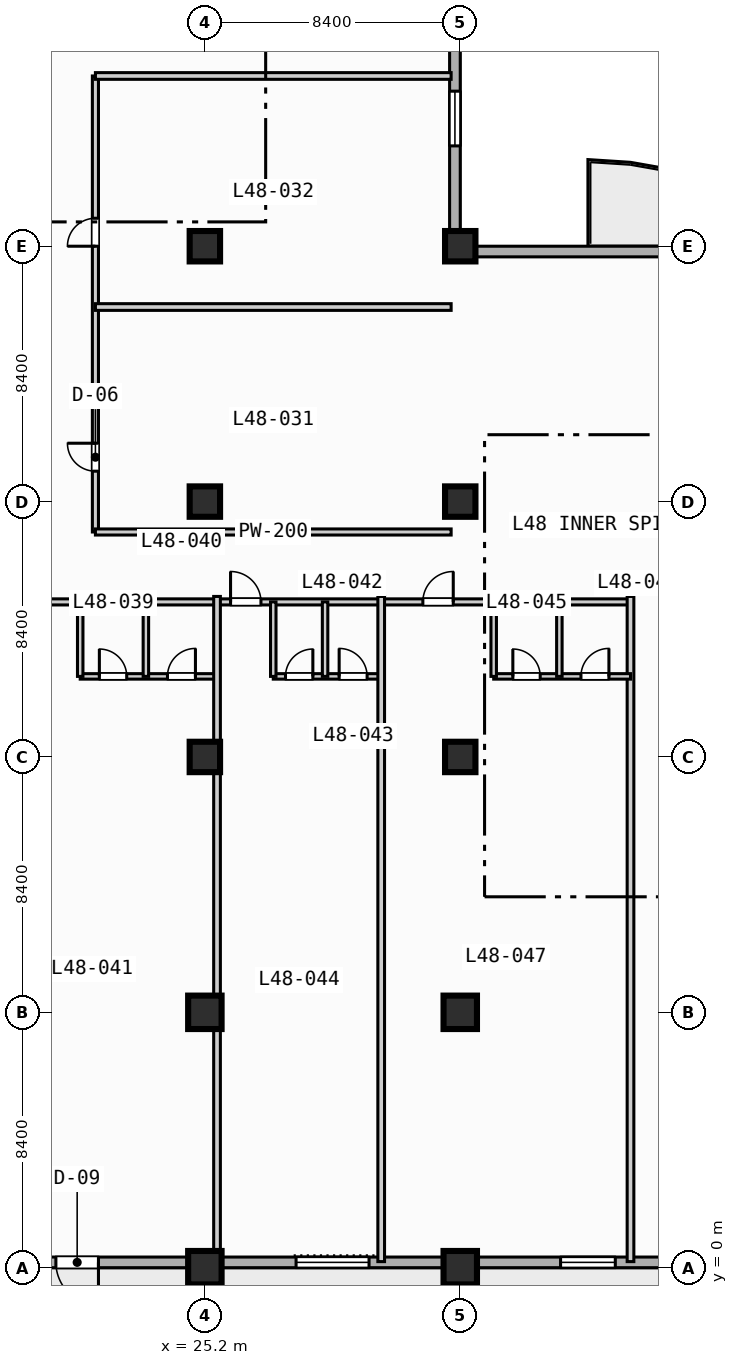
"""IFC4 building model, lengths in metres.
Left out: names, types, materials, properties, quantities, classifications, styles, units other than length and angle.
Written with IfcOpenShell. Run it as: python <this file> out.ifc"""

import sys

from ifc_helpers import new_model, si_unit, direction, frame, frame_2d, origin, origin_2d, place, context, subcontext, project, spatial, rectangle, extrude, element, fill, save


model = new_model("IFC4")
c1 = context("Model", 3, precision=1e-05, world=origin(), true_north=direction((0.0, 1.0)))
c2 = subcontext(c1, "Body", "Model", "MODEL_VIEW")
j1 = project(units=[si_unit("LENGTHUNIT", "METRE"), si_unit("PLANEANGLEUNIT", "RADIAN")], contexts=[c1])
p1 = place(None, origin())
s1 = spatial("IfcSite", under=j1, at=p1, CompositionType="ELEMENT")
p2 = place(p1, origin())
s2 = spatial("IfcBuilding", under=s1, at=p2, CompositionType="ELEMENT")
p3 = place(p2, frame((0.0, 0.0, 197.6)))
s3 = spatial("IfcBuildingStorey", under=s2, at=p3, CompositionType="ELEMENT", Elevation=197.6)
for number, where, z_axis, x_axis in (
    (1, (25.2, 0.0, 0.0), (0.0, 0.0, 1.0), (1.0, 0.0, 0.0)),
    (2, (25.2, 8.4, 0.0), (0.0, 0.0, 1.0), (1.0, 0.0, 0.0)),
):
    element("IfcColumn", number, at=place(p3, frame(where, z_axis=z_axis, x_axis=x_axis)), inside=s3, PredefinedType="COLUMN", context=c2, shape_type="SweptSolid", body=[
        extrude(rectangle(XDim=1.1, YDim=1.1, at=origin_2d()), origin(), (0.0, 0.0, 1.0), 3.7),
    ])
for number, where, z_axis, x_axis in (
    (3, (25.2, 16.8, 0.0), (0.0, 0.0, 1.0), (1.0, 0.0, 0.0)),
    (4, (25.2, 25.2, 0.0), (0.0, 0.0, 1.0), (1.0, 0.0, 0.0)),
    (5, (25.2, 33.6, 0.0), (0.0, 0.0, 1.0), (1.0, 0.0, 0.0)),
):
    element("IfcColumn", number, at=place(p3, frame(where, z_axis=z_axis, x_axis=x_axis)), inside=s3, PredefinedType="COLUMN", context=c2, shape_type="SweptSolid", body=[
        extrude(rectangle(XDim=1.0, YDim=1.0, at=origin_2d()), origin(), (0.0, 0.0, 1.0), 3.7),
    ])
for number, where, z_axis, x_axis in (
    (6, (33.6, 0.0, 0.0), (0.0, 0.0, 1.0), (1.0, 0.0, 0.0)),
    (7, (33.6, 8.4, 0.0), (0.0, 0.0, 1.0), (1.0, 0.0, 0.0)),
):
    element("IfcColumn", number, at=place(p3, frame(where, z_axis=z_axis, x_axis=x_axis)), inside=s3, PredefinedType="COLUMN", context=c2, shape_type="SweptSolid", body=[
        extrude(rectangle(XDim=1.1, YDim=1.1, at=origin_2d()), origin(), (0.0, 0.0, 1.0), 3.7),
    ])
for number, where, z_axis, x_axis in (
    (8, (33.6, 16.8, 0.0), (0.0, 0.0, 1.0), (1.0, 0.0, 0.0)),
    (9, (33.6, 25.2, 0.0), (0.0, 0.0, 1.0), (1.0, 0.0, 0.0)),
    (10, (33.6, 33.6, 0.0), (0.0, 0.0, 1.0), (1.0, 0.0, 0.0)),
):
    element("IfcColumn", number, at=place(p3, frame(where, z_axis=z_axis, x_axis=x_axis)), inside=s3, PredefinedType="COLUMN", context=c2, shape_type="SweptSolid", body=[
        extrude(rectangle(XDim=1.0, YDim=1.0, at=origin_2d()), origin(), (0.0, 0.0, 1.0), 3.7),
    ])
p4 = place(p3, frame((33.425, 72.425, 0.0), z_axis=(0.0, 0.0, 1.0), x_axis=(0.0, -1.0, 0.0)))
e11 = element("IfcWall", 11, at=p4, inside=s3, PredefinedType="STANDARD", context=c2, shape_type="SweptSolid", body=[
    extrude(rectangle(XDim=39.0, YDim=0.35, at=frame_2d((19.5, 0.0))), origin(), (0.0, 0.0, 1.0), 3.47),
])
p5 = place(p4, frame((33.725, 0.0, 0.85)))
e12 = element("IfcOpeningElement", 12, at=p5, cuts=e11, PredefinedType="OPENING", context=c2, shape_type="SweptSolid", body=[
    extrude(rectangle(XDim=1.8, YDim=1.8, at=frame_2d((0.9, 0.9))), frame((0.0, 0.185, 0.0), z_axis=(0.0, -1.0, 0.0), x_axis=(1.0, 0.0, 0.0)), (0.0, 0.0, 1.0), 0.37),
])
p6 = place(p4, frame((16.925, 0.0, 0.85)))
e13 = element("IfcOpeningElement", 13, at=p6, cuts=e11, PredefinedType="OPENING", context=c2, shape_type="SweptSolid", body=[
    extrude(rectangle(XDim=1.8, YDim=1.8, at=frame_2d((0.9, 0.9))), frame((0.0, 0.185, 0.0), z_axis=(0.0, -1.0, 0.0), x_axis=(1.0, 0.0, 0.0)), (0.0, 0.0, 1.0), 0.37),
])
p7 = place(p4, frame((8.225, 0.0, 0.85)))
e14 = element("IfcOpeningElement", 14, at=p7, cuts=e11, PredefinedType="OPENING", context=c2, shape_type="SweptSolid", body=[
    extrude(rectangle(XDim=2.4, YDim=1.95, at=frame_2d((1.2, 0.975))), frame((0.0, 0.185, 0.0), z_axis=(0.0, -1.0, 0.0), x_axis=(1.0, 0.0, 0.0)), (0.0, 0.0, 1.0), 0.37),
])
p8 = place(p3, frame((33.425, 33.425, 0.0), z_axis=(0.0, 0.0, 1.0), x_axis=(1.0, 0.0, 0.0)))
e15 = element("IfcWall", 15, at=p8, inside=s3, PredefinedType="STANDARD", context=c2, shape_type="SweptSolid", body=[
    extrude(rectangle(XDim=39.0, YDim=0.35, at=frame_2d((19.5, 0.0))), origin(), (0.0, 0.0, 1.0), 3.47),
])
p9 = place(p8, frame((12.075, 0.0, 0.0)))
e16 = element("IfcOpeningElement", 16, at=p9, cuts=e15, PredefinedType="OPENING", context=c2, shape_type="SweptSolid", body=[
    extrude(rectangle(XDim=1.4, YDim=2.2, at=frame_2d((0.7, 1.1))), frame((0.0, 0.185, 0.0), z_axis=(0.0, -1.0, 0.0), x_axis=(1.0, 0.0, 0.0)), (0.0, 0.0, 1.0), 0.37),
])
p10 = place(p3, frame((72.425, 0.175, 0.0), z_axis=(0.0, 0.0, 1.0), x_axis=(-1.0, 0.0, 0.0)))
e17 = element("IfcWall", 17, at=p10, inside=s3, PredefinedType="STANDARD", context=c2, shape_type="SweptSolid", body=[
    extrude(rectangle(XDim=69.25, YDim=0.35, at=frame_2d((34.625, 0.0))), origin(), (0.0, 0.0, 1.0), 3.47),
])
p11 = place(p10, frame((50.725, 0.0, 0.0)))
e18 = element("IfcOpeningElement", 18, at=p11, cuts=e17, PredefinedType="OPENING", context=c2, shape_type="SweptSolid", body=[
    extrude(rectangle(XDim=1.4, YDim=2.2, at=frame_2d((0.7, 1.1))), frame((0.0, 0.185, 0.0), z_axis=(0.0, -1.0, 0.0), x_axis=(1.0, 0.0, 0.0)), (0.0, 0.0, 1.0), 0.37),
])
p12 = place(p10, frame((58.625, 0.0, 0.85)))
e19 = element("IfcOpeningElement", 19, at=p12, cuts=e17, PredefinedType="OPENING", context=c2, shape_type="SweptSolid", body=[
    extrude(rectangle(XDim=2.4, YDim=1.95, at=frame_2d((1.2, 0.975))), frame((0.0, 0.185, 0.0), z_axis=(0.0, -1.0, 0.0), x_axis=(1.0, 0.0, 0.0)), (0.0, 0.0, 1.0), 0.37),
])
p13 = place(p10, frame((41.825, 0.0, 0.85)))
e20 = element("IfcOpeningElement", 20, at=p13, cuts=e17, PredefinedType="OPENING", context=c2, shape_type="SweptSolid", body=[
    extrude(rectangle(XDim=2.4, YDim=1.95, at=frame_2d((1.2, 0.975))), frame((0.0, 0.185, 0.0), z_axis=(0.0, -1.0, 0.0), x_axis=(1.0, 0.0, 0.0)), (0.0, 0.0, 1.0), 0.37),
])
p14 = place(p10, frame((33.725, 0.0, 0.85)))
e21 = element("IfcOpeningElement", 21, at=p14, cuts=e17, PredefinedType="OPENING", context=c2, shape_type="SweptSolid", body=[
    extrude(rectangle(XDim=1.8, YDim=1.8, at=frame_2d((0.9, 0.9))), frame((0.0, 0.185, 0.0), z_axis=(0.0, -1.0, 0.0), x_axis=(1.0, 0.0, 0.0)), (0.0, 0.0, 1.0), 0.37),
])
p15 = place(p10, frame((25.025, 0.0, 0.85)))
e22 = element("IfcOpeningElement", 22, at=p15, cuts=e17, PredefinedType="OPENING", context=c2, shape_type="SweptSolid", body=[
    extrude(rectangle(XDim=2.4, YDim=1.95, at=frame_2d((1.2, 0.975))), frame((0.0, 0.185, 0.0), z_axis=(0.0, -1.0, 0.0), x_axis=(1.0, 0.0, 0.0)), (0.0, 0.0, 1.0), 0.37),
])
p16 = place(p10, frame((64.875, 0.0, 0.85)))
e23 = element("IfcOpeningElement", 23, at=p16, cuts=e17, PredefinedType="OPENING", context=c2, shape_type="SweptSolid", body=[
    extrude(rectangle(XDim=1.8, YDim=1.8, at=frame_2d((0.9, 0.9))), frame((0.0, 0.185, 0.0), z_axis=(0.0, -1.0, 0.0), x_axis=(1.0, 0.0, 0.0)), (0.0, 0.0, 1.0), 0.37),
])
p17 = place(p3, frame((21.6, 24.2, 0.0), z_axis=(0.0, 0.0, 1.0), x_axis=(0.0, 1.0, 0.0)))
e24 = element("IfcWall", 24, at=p17, inside=s3, PredefinedType="PARTITIONING", context=c2, shape_type="SweptSolid", body=[
    extrude(rectangle(XDim=15.0, YDim=0.2, at=frame_2d((7.5, 0.0))), origin(), (0.0, 0.0, 1.0), 3.47),
])
p18 = place(p17, frame((2.0, 0.0, 0.0)))
e25 = element("IfcOpeningElement", 25, at=p18, cuts=e24, PredefinedType="OPENING", context=c2, shape_type="SweptSolid", body=[
    extrude(rectangle(XDim=0.92, YDim=2.1, at=frame_2d((0.46, 1.05))), frame((0.0, 0.11, 0.0), z_axis=(0.0, -1.0, 0.0), x_axis=(1.0, 0.0, 0.0)), (0.0, 0.0, 1.0), 0.22),
])
p19 = place(p17, frame((9.4, 0.0, 0.0)))
e26 = element("IfcOpeningElement", 26, at=p19, cuts=e24, PredefinedType="OPENING", context=c2, shape_type="SweptSolid", body=[
    extrude(rectangle(XDim=0.92, YDim=2.1, at=frame_2d((0.46, 1.05))), frame((0.0, 0.11, 0.0), z_axis=(0.0, -1.0, 0.0), x_axis=(1.0, 0.0, 0.0)), (0.0, 0.0, 1.0), 0.22),
])
p20 = place(p3, frame((21.6, 24.2, 0.0), z_axis=(0.0, 0.0, 1.0), x_axis=(1.0, 0.0, 0.0)))
e27 = element("IfcWall", 27, at=p20, inside=s3, PredefinedType="PARTITIONING", context=c2, shape_type="SweptSolid", body=[
    extrude(rectangle(XDim=11.7, YDim=0.2, at=frame_2d((5.85, 0.0))), origin(), (0.0, 0.0, 1.0), 3.47),
])
for number, where, z_axis, x_axis in (
    (28, (21.6, 31.6, 0.0), (0.0, 0.0, 1.0), (1.0, 0.0, 0.0)),
    (29, (21.6, 39.2, 0.0), (0.0, 0.0, 1.0), (1.0, 0.0, 0.0)),
):
    element("IfcWall", number, at=place(p3, frame(where, z_axis=z_axis, x_axis=x_axis)), inside=s3, PredefinedType="PARTITIONING", context=c2, shape_type="SweptSolid", body=[
        extrude(rectangle(XDim=11.7, YDim=0.22, at=frame_2d((5.85, 0.0))), origin(), (0.0, 0.0, 1.0), 3.47),
    ])
p21 = place(p3, frame((3.4, 21.9, 0.0), z_axis=(0.0, 0.0, 1.0), x_axis=(1.0, 0.0, 0.0)))
e30 = element("IfcWall", 30, at=p21, inside=s3, PredefinedType="PARTITIONING", context=c2, shape_type="SweptSolid", body=[
    extrude(rectangle(XDim=35.8, YDim=0.2, at=frame_2d((17.9, 0.0))), origin(), (0.0, 0.0, 1.0), 3.47),
])
p22 = place(p21, frame((0.97, 0.0, 0.0)))
e31 = element("IfcOpeningElement", 31, at=p22, cuts=e30, PredefinedType="OPENING", context=c2, shape_type="SweptSolid", body=[
    extrude(rectangle(XDim=1.0, YDim=2.15, at=frame_2d((0.5, 1.075))), frame((0.0, 0.11, 0.0), z_axis=(0.0, -1.0, 0.0), x_axis=(1.0, 0.0, 0.0)), (0.0, 0.0, 1.0), 0.22),
])
p23 = place(p21, frame((7.97, 0.0, 0.0)))
e32 = element("IfcOpeningElement", 32, at=p23, cuts=e30, PredefinedType="OPENING", context=c2, shape_type="SweptSolid", body=[
    extrude(rectangle(XDim=1.0, YDim=2.15, at=frame_2d((0.5, 1.075))), frame((0.0, 0.11, 0.0), z_axis=(0.0, -1.0, 0.0), x_axis=(1.0, 0.0, 0.0)), (0.0, 0.0, 1.0), 0.22),
])
p24 = place(p21, frame((15.37, 0.0, 0.0)))
e33 = element("IfcOpeningElement", 33, at=p24, cuts=e30, PredefinedType="OPENING", context=c2, shape_type="SweptSolid", body=[
    extrude(rectangle(XDim=1.0, YDim=2.15, at=frame_2d((0.5, 1.075))), frame((0.0, 0.11, 0.0), z_axis=(0.0, -1.0, 0.0), x_axis=(1.0, 0.0, 0.0)), (0.0, 0.0, 1.0), 0.22),
])
p25 = place(p21, frame((22.645, 0.0, 0.0)))
e34 = element("IfcOpeningElement", 34, at=p25, cuts=e30, PredefinedType="OPENING", context=c2, shape_type="SweptSolid", body=[
    extrude(rectangle(XDim=1.0, YDim=2.15, at=frame_2d((0.5, 1.075))), frame((0.0, 0.11, 0.0), z_axis=(0.0, -1.0, 0.0), x_axis=(1.0, 0.0, 0.0)), (0.0, 0.0, 1.0), 0.22),
])
p26 = place(p21, frame((28.97, 0.0, 0.0)))
e35 = element("IfcOpeningElement", 35, at=p26, cuts=e30, PredefinedType="OPENING", context=c2, shape_type="SweptSolid", body=[
    extrude(rectangle(XDim=1.0, YDim=2.15, at=frame_2d((0.5, 1.075))), frame((0.0, 0.11, 0.0), z_axis=(0.0, -1.0, 0.0), x_axis=(1.0, 0.0, 0.0)), (0.0, 0.0, 1.0), 0.22),
])
p27 = place(p3, frame((21.1, 19.45, 0.0), z_axis=(0.0, 0.0, 1.0), x_axis=(1.0, 0.0, 0.0)))
e36 = element("IfcWall", 36, at=p27, inside=s3, PredefinedType="PLUMBINGWALL", context=c2, shape_type="SweptSolid", body=[
    extrude(rectangle(XDim=4.5, YDim=0.18, at=frame_2d((2.25, 0.0))), origin(), (0.0, 0.0, 1.0), 3.47),
])
p28 = place(p27, frame((0.63, 0.0, 0.0)))
e37 = element("IfcOpeningElement", 37, at=p28, cuts=e36, PredefinedType="OPENING", context=c2, shape_type="SweptSolid", body=[
    extrude(rectangle(XDim=0.9, YDim=2.1, at=frame_2d((0.45, 1.05))), frame((0.0, 0.1, 0.0), z_axis=(0.0, -1.0, 0.0), x_axis=(1.0, 0.0, 0.0)), (0.0, 0.0, 1.0), 0.2),
])
p29 = place(p27, frame((2.87, 0.0, 0.0)))
e38 = element("IfcOpeningElement", 38, at=p29, cuts=e36, PredefinedType="OPENING", context=c2, shape_type="SweptSolid", body=[
    extrude(rectangle(XDim=0.92, YDim=2.1, at=frame_2d((0.46, 1.05))), frame((0.0, 0.1, 0.0), z_axis=(0.0, -1.0, 0.0), x_axis=(1.0, 0.0, 0.0)), (0.0, 0.0, 1.0), 0.2),
])
for number, where, z_axis, x_axis in (
    (39, (21.1, 19.45, 0.0), (0.0, 0.0, 1.0), (0.0, 1.0, 0.0)),
    (40, (23.26, 19.45, 0.0), (0.0, 0.0, 1.0), (0.0, 1.0, 0.0)),
):
    element("IfcWall", number, at=place(p3, frame(where, z_axis=z_axis, x_axis=x_axis)), inside=s3, PredefinedType="PLUMBINGWALL", context=c2, shape_type="SweptSolid", body=[
        extrude(rectangle(XDim=2.45, YDim=0.18, at=frame_2d((1.225, 0.0))), origin(), (0.0, 0.0, 1.0), 3.47),
    ])
p30 = place(p3, frame((25.6, 0.2, 0.0), z_axis=(0.0, 0.0, 1.0), x_axis=(0.0, 1.0, 0.0)))
e41 = element("IfcWall", 41, at=p30, inside=s3, PredefinedType="PARTITIONING", context=c2, shape_type="SweptSolid", body=[
    extrude(rectangle(XDim=21.88, YDim=0.22, at=frame_2d((10.94, 0.0))), origin(), (0.0, 0.0, 1.0), 3.47),
])
p31 = place(p3, frame((27.45, 19.45, 0.0), z_axis=(0.0, 0.0, 1.0), x_axis=(1.0, 0.0, 0.0)))
e42 = element("IfcWall", 42, at=p31, inside=s3, PredefinedType="PLUMBINGWALL", context=c2, shape_type="SweptSolid", body=[
    extrude(rectangle(XDim=3.55, YDim=0.18, at=frame_2d((1.775, 0.0))), origin(), (0.0, 0.0, 1.0), 3.47),
])
p32 = place(p31, frame((0.402, 0.0, 0.0)))
e43 = element("IfcOpeningElement", 43, at=p32, cuts=e42, PredefinedType="OPENING", context=c2, shape_type="SweptSolid", body=[
    extrude(rectangle(XDim=0.9, YDim=2.1, at=frame_2d((0.45, 1.05))), frame((0.0, 0.1, 0.0), z_axis=(0.0, -1.0, 0.0), x_axis=(1.0, 0.0, 0.0)), (0.0, 0.0, 1.0), 0.2),
])
p33 = place(p31, frame((2.167, 0.0, 0.0)))
e44 = element("IfcOpeningElement", 44, at=p33, cuts=e42, PredefinedType="OPENING", context=c2, shape_type="SweptSolid", body=[
    extrude(rectangle(XDim=0.92, YDim=2.1, at=frame_2d((0.46, 1.05))), frame((0.0, 0.1, 0.0), z_axis=(0.0, -1.0, 0.0), x_axis=(1.0, 0.0, 0.0)), (0.0, 0.0, 1.0), 0.2),
])
for number, where, z_axis, x_axis in (
    (45, (27.45, 19.45, 0.0), (0.0, 0.0, 1.0), (0.0, 1.0, 0.0)),
    (46, (29.154, 19.45, 0.0), (0.0, 0.0, 1.0), (0.0, 1.0, 0.0)),
):
    element("IfcWall", number, at=place(p3, frame(where, z_axis=z_axis, x_axis=x_axis)), inside=s3, PredefinedType="PLUMBINGWALL", context=c2, shape_type="SweptSolid", body=[
        extrude(rectangle(XDim=2.45, YDim=0.18, at=frame_2d((1.225, 0.0))), origin(), (0.0, 0.0, 1.0), 3.47),
    ])
for number, where, z_axis, x_axis in (
    (47, (31.0, 0.2, 0.0), (0.0, 0.0, 1.0), (0.0, 1.0, 0.0)),
    (48, (39.2, 0.2, 0.0), (0.0, 0.0, 1.0), (0.0, 1.0, 0.0)),
):
    element("IfcWall", number, at=place(p3, frame(where, z_axis=z_axis, x_axis=x_axis)), inside=s3, PredefinedType="PARTITIONING", context=c2, shape_type="SweptSolid", body=[
        extrude(rectangle(XDim=21.88, YDim=0.22, at=frame_2d((10.94, 0.0))), origin(), (0.0, 0.0, 1.0), 3.47),
    ])
p34 = place(p3, frame((34.7, 19.45, 0.0), z_axis=(0.0, 0.0, 1.0), x_axis=(1.0, 0.0, 0.0)))
e49 = element("IfcWall", 49, at=p34, inside=s3, PredefinedType="PLUMBINGWALL", context=c2, shape_type="SweptSolid", body=[
    extrude(rectangle(XDim=4.5, YDim=0.18, at=frame_2d((2.25, 0.0))), origin(), (0.0, 0.0, 1.0), 3.47),
])
p35 = place(p34, frame((0.63, 0.0, 0.0)))
e50 = element("IfcOpeningElement", 50, at=p35, cuts=e49, PredefinedType="OPENING", context=c2, shape_type="SweptSolid", body=[
    extrude(rectangle(XDim=0.9, YDim=2.1, at=frame_2d((0.45, 1.05))), frame((0.0, 0.1, 0.0), z_axis=(0.0, -1.0, 0.0), x_axis=(1.0, 0.0, 0.0)), (0.0, 0.0, 1.0), 0.2),
])
p36 = place(p34, frame((2.87, 0.0, 0.0)))
e51 = element("IfcOpeningElement", 51, at=p36, cuts=e49, PredefinedType="OPENING", context=c2, shape_type="SweptSolid", body=[
    extrude(rectangle(XDim=0.92, YDim=2.1, at=frame_2d((0.46, 1.05))), frame((0.0, 0.1, 0.0), z_axis=(0.0, -1.0, 0.0), x_axis=(1.0, 0.0, 0.0)), (0.0, 0.0, 1.0), 0.2),
])
for number, where, z_axis, x_axis in (
    (52, (34.7, 19.45, 0.0), (0.0, 0.0, 1.0), (0.0, 1.0, 0.0)),
    (53, (36.86, 19.45, 0.0), (0.0, 0.0, 1.0), (0.0, 1.0, 0.0)),
):
    element("IfcWall", number, at=place(p3, frame(where, z_axis=z_axis, x_axis=x_axis)), inside=s3, PredefinedType="PLUMBINGWALL", context=c2, shape_type="SweptSolid", body=[
        extrude(rectangle(XDim=2.45, YDim=0.18, at=frame_2d((1.225, 0.0))), origin(), (0.0, 0.0, 1.0), 3.47),
    ])
p37 = place(p5, origin())
e54 = element("IfcWindow", 54, at=p37, inside=s3, PartitioningType="SINGLE_PANEL", PredefinedType="WINDOW", context=c2, shape_type="SweptSolid", body=[
    extrude(rectangle(XDim=1.8, YDim=1.8, at=frame_2d((0.9, 0.9))), frame((0.0, 0.03, 0.0), z_axis=(0.0, -1.0, 0.0), x_axis=(1.0, 0.0, 0.0)), (0.0, 0.0, 1.0), 0.06),
])
fill(e12, e54)
p38 = place(p11, origin())
e55 = element("IfcDoor", 55, at=p38, inside=s3, OperationType="SINGLE_SWING_LEFT", PredefinedType="DOOR", context=c2, shape_type="SweptSolid", body=[
    extrude(rectangle(XDim=1.4, YDim=2.2, at=frame_2d((0.7, 1.1))), frame((0.0, 0.025, 0.0), z_axis=(0.0, -1.0, 0.0), x_axis=(1.0, 0.0, 0.0)), (0.0, 0.0, 1.0), 0.05),
])
fill(e18, e55)
p39 = place(p13, origin())
e56 = element("IfcWindow", 56, at=p39, inside=s3, PartitioningType="SINGLE_PANEL", PredefinedType="WINDOW", context=c2, shape_type="SweptSolid", body=[
    extrude(rectangle(XDim=2.4, YDim=1.95, at=frame_2d((1.2, 0.975))), frame((0.0, 0.03, 0.0), z_axis=(0.0, -1.0, 0.0), x_axis=(1.0, 0.0, 0.0)), (0.0, 0.0, 1.0), 0.06),
])
fill(e20, e56)
p40 = place(p14, origin())
e57 = element("IfcWindow", 57, at=p40, inside=s3, PartitioningType="SINGLE_PANEL", PredefinedType="WINDOW", context=c2, shape_type="SweptSolid", body=[
    extrude(rectangle(XDim=1.8, YDim=1.8, at=frame_2d((0.9, 0.9))), frame((0.0, 0.03, 0.0), z_axis=(0.0, -1.0, 0.0), x_axis=(1.0, 0.0, 0.0)), (0.0, 0.0, 1.0), 0.06),
])
fill(e21, e57)
p41 = place(p18, origin())
e58 = element("IfcDoor", 58, at=p41, inside=s3, OperationType="SINGLE_SWING_RIGHT", PredefinedType="DOOR", context=c2, shape_type="SweptSolid", body=[
    extrude(rectangle(XDim=0.92, YDim=2.1, at=frame_2d((0.46, 1.05))), frame((0.0, 0.025, 0.0), z_axis=(0.0, -1.0, 0.0), x_axis=(1.0, 0.0, 0.0)), (0.0, 0.0, 1.0), 0.05),
])
fill(e25, e58)
p42 = place(p19, origin())
e59 = element("IfcDoor", 59, at=p42, inside=s3, OperationType="SINGLE_SWING_LEFT", PredefinedType="DOOR", context=c2, shape_type="SweptSolid", body=[
    extrude(rectangle(XDim=0.92, YDim=2.1, at=frame_2d((0.46, 1.05))), frame((0.0, 0.025, 0.0), z_axis=(0.0, -1.0, 0.0), x_axis=(1.0, 0.0, 0.0)), (0.0, 0.0, 1.0), 0.05),
])
fill(e26, e59)
p43 = place(p25, origin())
e60 = element("IfcDoor", 60, at=p43, inside=s3, OperationType="SINGLE_SWING_LEFT", PredefinedType="DOOR", context=c2, shape_type="SweptSolid", body=[
    extrude(rectangle(XDim=1.0, YDim=2.15, at=frame_2d((0.5, 1.075))), frame((0.0, 0.025, 0.0), z_axis=(0.0, -1.0, 0.0), x_axis=(1.0, 0.0, 0.0)), (0.0, 0.0, 1.0), 0.05),
])
fill(e34, e60)
p44 = place(p26, origin())
e61 = element("IfcDoor", 61, at=p44, inside=s3, OperationType="SINGLE_SWING_RIGHT", PredefinedType="DOOR", context=c2, shape_type="SweptSolid", body=[
    extrude(rectangle(XDim=1.0, YDim=2.15, at=frame_2d((0.5, 1.075))), frame((0.0, 0.025, 0.0), z_axis=(0.0, -1.0, 0.0), x_axis=(1.0, 0.0, 0.0)), (0.0, 0.0, 1.0), 0.05),
])
fill(e35, e61)
p45 = place(p28, origin())
e62 = element("IfcDoor", 62, at=p45, inside=s3, OperationType="SINGLE_SWING_LEFT", PredefinedType="DOOR", context=c2, shape_type="SweptSolid", body=[
    extrude(rectangle(XDim=0.9, YDim=2.1, at=frame_2d((0.45, 1.05))), frame((0.0, 0.025, 0.0), z_axis=(0.0, -1.0, 0.0), x_axis=(1.0, 0.0, 0.0)), (0.0, 0.0, 1.0), 0.05),
])
fill(e37, e62)
p46 = place(p29, origin())
e63 = element("IfcDoor", 63, at=p46, inside=s3, OperationType="SINGLE_SWING_RIGHT", PredefinedType="DOOR", context=c2, shape_type="SweptSolid", body=[
    extrude(rectangle(XDim=0.92, YDim=2.1, at=frame_2d((0.46, 1.05))), frame((0.0, 0.025, 0.0), z_axis=(0.0, -1.0, 0.0), x_axis=(1.0, 0.0, 0.0)), (0.0, 0.0, 1.0), 0.05),
])
fill(e38, e63)
p47 = place(p32, origin())
e64 = element("IfcDoor", 64, at=p47, inside=s3, OperationType="SINGLE_SWING_RIGHT", PredefinedType="DOOR", context=c2, shape_type="SweptSolid", body=[
    extrude(rectangle(XDim=0.9, YDim=2.1, at=frame_2d((0.45, 1.05))), frame((0.0, 0.025, 0.0), z_axis=(0.0, -1.0, 0.0), x_axis=(1.0, 0.0, 0.0)), (0.0, 0.0, 1.0), 0.05),
])
fill(e43, e64)
p48 = place(p33, origin())
e65 = element("IfcDoor", 65, at=p48, inside=s3, OperationType="SINGLE_SWING_LEFT", PredefinedType="DOOR", context=c2, shape_type="SweptSolid", body=[
    extrude(rectangle(XDim=0.92, YDim=2.1, at=frame_2d((0.46, 1.05))), frame((0.0, 0.025, 0.0), z_axis=(0.0, -1.0, 0.0), x_axis=(1.0, 0.0, 0.0)), (0.0, 0.0, 1.0), 0.05),
])
fill(e44, e65)
p49 = place(p35, origin())
e66 = element("IfcDoor", 66, at=p49, inside=s3, OperationType="SINGLE_SWING_LEFT", PredefinedType="DOOR", context=c2, shape_type="SweptSolid", body=[
    extrude(rectangle(XDim=0.9, YDim=2.1, at=frame_2d((0.45, 1.05))), frame((0.0, 0.025, 0.0), z_axis=(0.0, -1.0, 0.0), x_axis=(1.0, 0.0, 0.0)), (0.0, 0.0, 1.0), 0.05),
])
fill(e50, e66)
p50 = place(p36, origin())
e67 = element("IfcDoor", 67, at=p50, inside=s3, OperationType="SINGLE_SWING_RIGHT", PredefinedType="DOOR", context=c2, shape_type="SweptSolid", body=[
    extrude(rectangle(XDim=0.92, YDim=2.1, at=frame_2d((0.46, 1.05))), frame((0.0, 0.025, 0.0), z_axis=(0.0, -1.0, 0.0), x_axis=(1.0, 0.0, 0.0)), (0.0, 0.0, 1.0), 0.05),
])
fill(e51, e67)
save(model, sys.argv[1])
